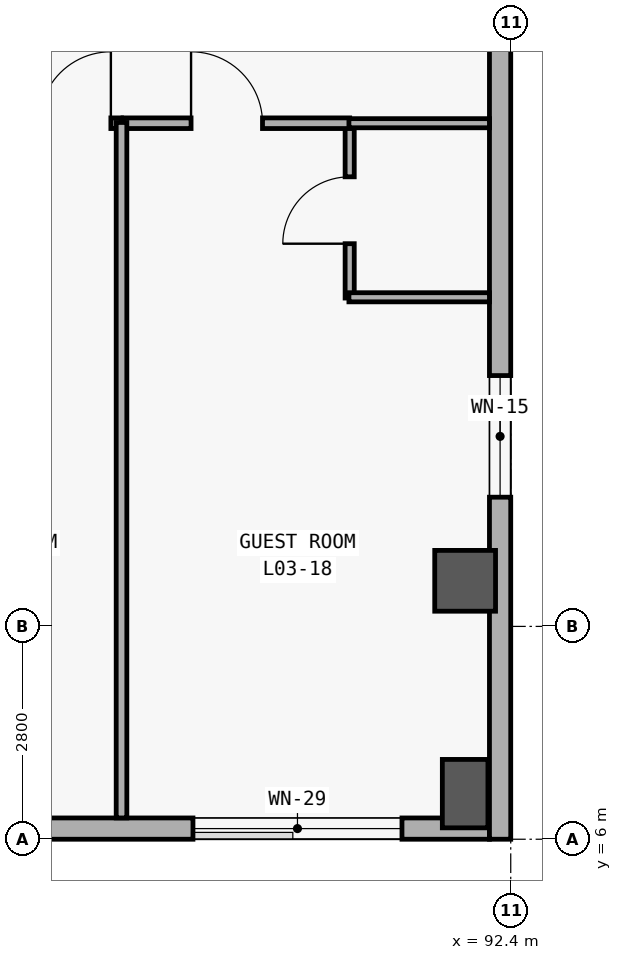
"""IFC4 building model, lengths in metres.
Left out: names, types, materials, properties, quantities, classifications, styles, units other than length and angle.
Written with IfcOpenShell. Run it as: python <this file> out.ifc"""

import sys

from ifc_helpers import new_model, si_unit, direction, frame, frame_2d, origin, origin_2d, place, context, subcontext, project, spatial, rectangle, extrude, element, fill, save


model = new_model("IFC4")
c1 = context("Model", 3, precision=1e-05, world=origin(), true_north=direction((0.0, 1.0)))
c2 = subcontext(c1, "Body", "Model", "MODEL_VIEW")
j1 = project(units=[si_unit("LENGTHUNIT", "METRE"), si_unit("PLANEANGLEUNIT", "RADIAN")], contexts=[c1])
p1 = place(None, origin())
s1 = spatial("IfcSite", under=j1, at=p1, CompositionType="ELEMENT")
p2 = place(p1, origin())
s2 = spatial("IfcBuilding", under=s1, at=p2, CompositionType="ELEMENT")
p3 = place(p2, frame((0.0, 0.0, 15.0)))
s3 = spatial("IfcBuildingStorey", under=s2, at=p3, CompositionType="ELEMENT", Elevation=15.0)
p4 = place(p3, frame((91.8, 6.6, 0.0), z_axis=(0.0, 0.0, 1.0), x_axis=(0.0, 1.0, 0.0)))
e1 = element("IfcColumn", 1, at=p4, inside=s3, PredefinedType="COLUMN", context=c2, shape_type="SweptSolid", body=[
    extrude(rectangle(XDim=0.6, YDim=0.9, at=origin_2d()), origin(), (0.0, 0.0, 1.0), 4.2),
])
p5 = place(p3, frame((91.8, 9.4, 0.0), z_axis=(0.0, 0.0, 1.0), x_axis=(1.0, 0.0, 0.0)))
e2 = element("IfcColumn", 2, at=p5, inside=s3, PredefinedType="COLUMN", context=c2, shape_type="SweptSolid", body=[
    extrude(rectangle(XDim=0.8, YDim=0.8, at=origin_2d()), origin(), (0.0, 0.0, 1.0), 4.2),
])
p6 = place(p3, frame((92.12, 6.14, 0.0), z_axis=(0.0, 0.0, 1.0), x_axis=(-1.0, 0.0, 0.0)))
e3 = element("IfcWall", 3, at=p6, inside=s3, PredefinedType="SOLIDWALL", context=c2, shape_type="SweptSolid", body=[
    extrude(rectangle(XDim=83.44, YDim=0.28, at=frame_2d((41.72, 0.0))), origin(), (0.0, 0.0, 1.0), 3.92),
])
p7 = place(p6, frame((79.49, 0.0, 0.85)))
e4 = element("IfcOpeningElement", 4, at=p7, cuts=e3, PredefinedType="OPENING", context=c2, shape_type="SweptSolid", body=[
    extrude(rectangle(XDim=2.85, YDim=1.85, at=frame_2d((1.425, 0.925))), frame((0.0, 0.15, 0.0), z_axis=(0.0, -1.0, 0.0), x_axis=(1.0, 0.0, 0.0)), (0.0, 0.0, 1.0), 0.3),
])
p8 = place(p6, frame((74.704, 0.0, 0.85)))
e5 = element("IfcOpeningElement", 5, at=p8, cuts=e3, PredefinedType="OPENING", context=c2, shape_type="SweptSolid", body=[
    extrude(rectangle(XDim=3.2, YDim=1.95, at=frame_2d((1.6, 0.975))), frame((0.0, 0.15, 0.0), z_axis=(0.0, -1.0, 0.0), x_axis=(1.0, 0.0, 0.0)), (0.0, 0.0, 1.0), 0.3),
])
p9 = place(p6, frame((69.942, 0.0, 0.85)))
e6 = element("IfcOpeningElement", 6, at=p9, cuts=e3, PredefinedType="OPENING", context=c2, shape_type="SweptSolid", body=[
    extrude(rectangle(XDim=3.5, YDim=2.0, at=frame_2d((1.75, 1.0))), frame((0.0, 0.15, 0.0), z_axis=(0.0, -1.0, 0.0), x_axis=(1.0, 0.0, 0.0)), (0.0, 0.0, 1.0), 0.3),
])
p10 = place(p6, frame((66.382, 0.0, 0.85)))
e7 = element("IfcOpeningElement", 7, at=p10, cuts=e3, PredefinedType="OPENING", context=c2, shape_type="SweptSolid", body=[
    extrude(rectangle(XDim=1.4, YDim=1.6, at=frame_2d((0.7, 0.8))), frame((0.0, 0.15, 0.0), z_axis=(0.0, -1.0, 0.0), x_axis=(1.0, 0.0, 0.0)), (0.0, 0.0, 1.0), 0.3),
])
p11 = place(p6, frame((61.67, 0.0, 0.85)))
e8 = element("IfcOpeningElement", 8, at=p11, cuts=e3, PredefinedType="OPENING", context=c2, shape_type="SweptSolid", body=[
    extrude(rectangle(XDim=1.6, YDim=1.6, at=frame_2d((0.8, 0.8))), frame((0.0, 0.15, 0.0), z_axis=(0.0, -1.0, 0.0), x_axis=(1.0, 0.0, 0.0)), (0.0, 0.0, 1.0), 0.3),
])
p12 = place(p6, frame((56.959, 0.0, 0.85)))
e9 = element("IfcOpeningElement", 9, at=p12, cuts=e3, PredefinedType="OPENING", context=c2, shape_type="SweptSolid", body=[
    extrude(rectangle(XDim=1.8, YDim=1.6, at=frame_2d((0.9, 0.8))), frame((0.0, 0.15, 0.0), z_axis=(0.0, -1.0, 0.0), x_axis=(1.0, 0.0, 0.0)), (0.0, 0.0, 1.0), 0.3),
])
p13 = place(p6, frame((52.248, 0.0, 0.85)))
e10 = element("IfcOpeningElement", 10, at=p13, cuts=e3, PredefinedType="OPENING", context=c2, shape_type="SweptSolid", body=[
    extrude(rectangle(XDim=2.0, YDim=1.65, at=frame_2d((1.0, 0.825))), frame((0.0, 0.15, 0.0), z_axis=(0.0, -1.0, 0.0), x_axis=(1.0, 0.0, 0.0)), (0.0, 0.0, 1.0), 0.3),
])
p14 = place(p6, frame((47.536, 0.0, 0.85)))
e11 = element("IfcOpeningElement", 11, at=p14, cuts=e3, PredefinedType="OPENING", context=c2, shape_type="SweptSolid", body=[
    extrude(rectangle(XDim=2.2, YDim=1.65, at=frame_2d((1.1, 0.825))), frame((0.0, 0.15, 0.0), z_axis=(0.0, -1.0, 0.0), x_axis=(1.0, 0.0, 0.0)), (0.0, 0.0, 1.0), 0.3),
])
p15 = place(p6, frame((42.726, 0.0, 0.85)))
e12 = element("IfcOpeningElement", 12, at=p15, cuts=e3, PredefinedType="OPENING", context=c2, shape_type="SweptSolid", body=[
    extrude(rectangle(XDim=2.6, YDim=2.2, at=frame_2d((1.3, 1.1))), frame((0.0, 0.15, 0.0), z_axis=(0.0, -1.0, 0.0), x_axis=(1.0, 0.0, 0.0)), (0.0, 0.0, 1.0), 0.3),
])
p16 = place(p6, frame((37.865, 0.0, 0.85)))
e13 = element("IfcOpeningElement", 13, at=p16, cuts=e3, PredefinedType="OPENING", context=c2, shape_type="SweptSolid", body=[
    extrude(rectangle(XDim=3.1, YDim=2.2, at=frame_2d((1.55, 1.1))), frame((0.0, 0.15, 0.0), z_axis=(0.0, -1.0, 0.0), x_axis=(1.0, 0.0, 0.0)), (0.0, 0.0, 1.0), 0.3),
])
p17 = place(p6, frame((33.004, 0.0, 0.85)))
e14 = element("IfcOpeningElement", 14, at=p17, cuts=e3, PredefinedType="OPENING", context=c2, shape_type="SweptSolid", body=[
    extrude(rectangle(XDim=3.6, YDim=2.3, at=frame_2d((1.8, 1.15))), frame((0.0, 0.15, 0.0), z_axis=(0.0, -1.0, 0.0), x_axis=(1.0, 0.0, 0.0)), (0.0, 0.0, 1.0), 0.3),
])
p18 = place(p6, frame((29.568, 0.0, 0.85)))
e15 = element("IfcOpeningElement", 15, at=p18, cuts=e3, PredefinedType="OPENING", context=c2, shape_type="SweptSolid", body=[
    extrude(rectangle(XDim=1.25, YDim=1.45, at=frame_2d((0.625, 0.725))), frame((0.0, 0.15, 0.0), z_axis=(0.0, -1.0, 0.0), x_axis=(1.0, 0.0, 0.0)), (0.0, 0.0, 1.0), 0.3),
])
p19 = place(p6, frame((24.907, 0.0, 0.85)))
e16 = element("IfcOpeningElement", 16, at=p19, cuts=e3, PredefinedType="OPENING", context=c2, shape_type="SweptSolid", body=[
    extrude(rectangle(XDim=1.35, YDim=1.55, at=frame_2d((0.675, 0.775))), frame((0.0, 0.15, 0.0), z_axis=(0.0, -1.0, 0.0), x_axis=(1.0, 0.0, 0.0)), (0.0, 0.0, 1.0), 0.3),
])
p20 = place(p6, frame((20.245, 0.0, 0.85)))
e17 = element("IfcOpeningElement", 17, at=p20, cuts=e3, PredefinedType="OPENING", context=c2, shape_type="SweptSolid", body=[
    extrude(rectangle(XDim=1.45, YDim=1.65, at=frame_2d((0.725, 0.825))), frame((0.0, 0.15, 0.0), z_axis=(0.0, -1.0, 0.0), x_axis=(1.0, 0.0, 0.0)), (0.0, 0.0, 1.0), 0.3),
])
p21 = place(p6, frame((15.584, 0.0, 0.85)))
e18 = element("IfcOpeningElement", 18, at=p21, cuts=e3, PredefinedType="OPENING", context=c2, shape_type="SweptSolid", body=[
    extrude(rectangle(XDim=1.55, YDim=1.65, at=frame_2d((0.775, 0.825))), frame((0.0, 0.15, 0.0), z_axis=(0.0, -1.0, 0.0), x_axis=(1.0, 0.0, 0.0)), (0.0, 0.0, 1.0), 0.3),
])
p22 = place(p6, frame((10.898, 0.0, 0.85)))
e19 = element("IfcOpeningElement", 19, at=p22, cuts=e3, PredefinedType="OPENING", context=c2, shape_type="SweptSolid", body=[
    extrude(rectangle(XDim=1.7, YDim=2.0, at=frame_2d((0.85, 1.0))), frame((0.0, 0.15, 0.0), z_axis=(0.0, -1.0, 0.0), x_axis=(1.0, 0.0, 0.0)), (0.0, 0.0, 1.0), 0.3),
])
p23 = place(p6, frame((5.987, 0.0, 0.85)))
e20 = element("IfcOpeningElement", 20, at=p23, cuts=e3, PredefinedType="OPENING", context=c2, shape_type="SweptSolid", body=[
    extrude(rectangle(XDim=2.3, YDim=2.05, at=frame_2d((1.15, 1.025))), frame((0.0, 0.15, 0.0), z_axis=(0.0, -1.0, 0.0), x_axis=(1.0, 0.0, 0.0)), (0.0, 0.0, 1.0), 0.3),
])
p24 = place(p6, frame((1.151, 0.0, 0.85)))
e21 = element("IfcOpeningElement", 21, at=p24, cuts=e3, PredefinedType="OPENING", context=c2, shape_type="SweptSolid", body=[
    extrude(rectangle(XDim=2.75, YDim=2.1, at=frame_2d((1.375, 1.05))), frame((0.0, 0.15, 0.0), z_axis=(0.0, -1.0, 0.0), x_axis=(1.0, 0.0, 0.0)), (0.0, 0.0, 1.0), 0.3),
])
p25 = place(p3, frame((92.26, 34.0, 0.0), z_axis=(0.0, 0.0, 1.0), x_axis=(0.0, -1.0, 0.0)))
e22 = element("IfcWall", 22, at=p25, inside=s3, PredefinedType="SOLIDWALL", context=c2, shape_type="SweptSolid", body=[
    extrude(rectangle(XDim=28.0, YDim=0.28, at=frame_2d((14.0, 0.0))), origin(), (0.0, 0.0, 1.0), 3.92),
])
p26 = place(p25, frame((21.9, 0.0, 0.95)))
e23 = element("IfcOpeningElement", 23, at=p26, cuts=e22, PredefinedType="OPENING", context=c2, shape_type="SweptSolid", body=[
    extrude(rectangle(XDim=1.6, YDim=1.6, at=frame_2d((0.8, 0.8))), frame((0.0, 0.15, 0.0), z_axis=(0.0, -1.0, 0.0), x_axis=(1.0, 0.0, 0.0)), (0.0, 0.0, 1.0), 0.3),
])
p27 = place(p3, frame((90.281, 13.12, 0.0), z_axis=(0.0, 0.0, 1.0), x_axis=(0.0, 1.0, 0.0)))
e24 = element("IfcWall", 24, at=p27, inside=s3, PredefinedType="PARTITIONING", context=c2, shape_type="SweptSolid", body=[
    extrude(rectangle(XDim=2.31, YDim=0.12, at=frame_2d((1.155, 0.0))), origin(), (0.0, 0.0, 1.0), 3.02),
])
p28 = place(p27, frame((0.715, 0.0, 0.0)))
e25 = element("IfcOpeningElement", 25, at=p28, cuts=e24, PredefinedType="OPENING", context=c2, shape_type="SweptSolid", body=[
    extrude(rectangle(XDim=0.88, YDim=2.15, at=frame_2d((0.44, 1.075))), frame((0.0, 0.07, 0.0), z_axis=(0.0, -1.0, 0.0), x_axis=(1.0, 0.0, 0.0)), (0.0, 0.0, 1.0), 0.14),
])
p29 = place(p3, frame((84.297, 15.42, 0.0), z_axis=(0.0, 0.0, 1.0), x_axis=(1.0, 0.0, 0.0)))
e26 = element("IfcWall", 26, at=p29, inside=s3, PredefinedType="PARTITIONING", context=c2, shape_type="SweptSolid", body=[
    extrude(rectangle(XDim=2.982, YDim=0.14, at=frame_2d((1.491, 0.0))), origin(), (0.0, 0.0, 1.0), 3.02),
])
p30 = place(p29, frame((1.902, 0.0, 0.0)))
e27 = element("IfcOpeningElement", 27, at=p30, cuts=e26, PredefinedType="OPENING", context=c2, shape_type="SweptSolid", body=[
    extrude(rectangle(XDim=0.94, YDim=2.2, at=frame_2d((0.47, 1.1))), frame((0.0, 0.08, 0.0), z_axis=(0.0, -1.0, 0.0), x_axis=(1.0, 0.0, 0.0)), (0.0, 0.0, 1.0), 0.16),
])
p31 = place(p3, frame((87.299, 15.42, 0.0), z_axis=(0.0, 0.0, 1.0), x_axis=(1.0, 0.0, 0.0)))
e28 = element("IfcWall", 28, at=p31, inside=s3, PredefinedType="PARTITIONING", context=c2, shape_type="SweptSolid", body=[
    extrude(rectangle(XDim=2.982, YDim=0.14, at=frame_2d((1.491, 0.0))), origin(), (0.0, 0.0, 1.0), 3.02),
])
p32 = place(p31, frame((0.895, 0.0, 0.0)))
e29 = element("IfcOpeningElement", 29, at=p32, cuts=e28, PredefinedType="OPENING", context=c2, shape_type="SweptSolid", body=[
    extrude(rectangle(XDim=0.94, YDim=2.2, at=frame_2d((0.47, 1.1))), frame((0.0, 0.08, 0.0), z_axis=(0.0, -1.0, 0.0), x_axis=(1.0, 0.0, 0.0)), (0.0, 0.0, 1.0), 0.16),
])
for number, where, z_axis, x_axis in (
    (30, (90.271, 13.13, 0.0), (0.0, 0.0, 1.0), (1.0, 0.0, 0.0)),
    (31, (90.271, 15.42, 0.0), (0.0, 0.0, 1.0), (1.0, 0.0, 0.0)),
):
    element("IfcWall", number, at=place(p3, frame(where, z_axis=z_axis, x_axis=x_axis)), inside=s3, PredefinedType="PARTITIONING", context=c2, shape_type="SweptSolid", body=[
        extrude(rectangle(XDim=1.849, YDim=0.12, at=frame_2d((0.925, 0.0))), origin(), (0.0, 0.0, 1.0), 3.02),
    ])
p33 = place(p3, frame((87.279, 6.28, 0.0), z_axis=(0.0, 0.0, 1.0), x_axis=(0.0, 1.0, 0.0)))
e32 = element("IfcWall", 32, at=p33, inside=s3, PredefinedType="PARTITIONING", context=c2, shape_type="SweptSolid", body=[
    extrude(rectangle(XDim=9.15, YDim=0.14, at=frame_2d((4.575, 0.0))), origin(), (0.0, 0.0, 1.0), 3.02),
])
p34 = place(p24, origin())
e33 = element("IfcWindow", 33, at=p34, inside=s3, PartitioningType="SINGLE_PANEL", PredefinedType="WINDOW", context=c2, shape_type="SweptSolid", body=[
    extrude(rectangle(XDim=2.75, YDim=2.1, at=frame_2d((1.375, 1.05))), frame((0.0, 0.03, 0.0), z_axis=(0.0, -1.0, 0.0), x_axis=(1.0, 0.0, 0.0)), (0.0, 0.0, 1.0), 0.06),
])
fill(e21, e33)
p35 = place(p26, origin())
e34 = element("IfcWindow", 34, at=p35, inside=s3, PartitioningType="SINGLE_PANEL", PredefinedType="WINDOW", context=c2, shape_type="SweptSolid", body=[
    extrude(rectangle(XDim=1.6, YDim=1.6, at=frame_2d((0.8, 0.8))), frame((0.0, 0.03, 0.0), z_axis=(0.0, -1.0, 0.0), x_axis=(1.0, 0.0, 0.0)), (0.0, 0.0, 1.0), 0.06),
])
fill(e23, e34)
p36 = place(p28, origin())
e35 = element("IfcDoor", 35, at=p36, inside=s3, OperationType="SINGLE_SWING_LEFT", PredefinedType="DOOR", context=c2, shape_type="SweptSolid", body=[
    extrude(rectangle(XDim=0.88, YDim=2.15, at=frame_2d((0.44, 1.075))), frame((0.0, 0.025, 0.0), z_axis=(0.0, -1.0, 0.0), x_axis=(1.0, 0.0, 0.0)), (0.0, 0.0, 1.0), 0.05),
])
fill(e25, e35)
p37 = place(p30, origin())
e36 = element("IfcDoor", 36, at=p37, inside=s3, OperationType="SINGLE_SWING_RIGHT", PredefinedType="DOOR", context=c2, shape_type="SweptSolid", body=[
    extrude(rectangle(XDim=0.94, YDim=2.2, at=frame_2d((0.47, 1.1))), frame((0.0, 0.025, 0.0), z_axis=(0.0, -1.0, 0.0), x_axis=(1.0, 0.0, 0.0)), (0.0, 0.0, 1.0), 0.05),
])
fill(e27, e36)
p38 = place(p32, origin())
e37 = element("IfcDoor", 37, at=p38, inside=s3, OperationType="SINGLE_SWING_LEFT", PredefinedType="DOOR", context=c2, shape_type="SweptSolid", body=[
    extrude(rectangle(XDim=0.94, YDim=2.2, at=frame_2d((0.47, 1.1))), frame((0.0, 0.025, 0.0), z_axis=(0.0, -1.0, 0.0), x_axis=(1.0, 0.0, 0.0)), (0.0, 0.0, 1.0), 0.05),
])
fill(e29, e37)
save(model, sys.argv[1])
